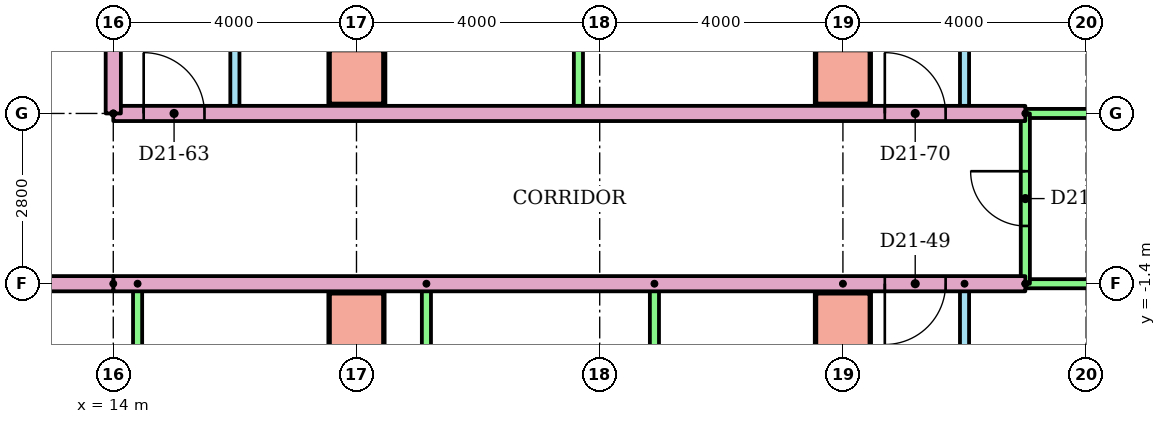
"""IFC4 building model, lengths in metres.
Left out: names, types, materials, properties, quantities, classifications, styles, units other than length and angle.
Written with IfcOpenShell. Run it as: python <this file> out.ifc"""

import sys

from ifc_helpers import new_model, si_unit, direction, frame, frame_2d, origin, origin_2d, place, context, subcontext, project, spatial, rectangle, extrude, element, fill, save


model = new_model("IFC4")
c1 = context("Model", 3, precision=1e-05, world=origin(), true_north=direction((0.0, 1.0)))
c2 = subcontext(c1, "Body", "Model", "MODEL_VIEW")
j1 = project(units=[si_unit("LENGTHUNIT", "METRE"), si_unit("PLANEANGLEUNIT", "RADIAN")], contexts=[c1])
p1 = place(None, origin())
s1 = spatial("IfcSite", under=j1, at=p1, CompositionType="ELEMENT")
p2 = place(p1, origin())
s2 = spatial("IfcBuilding", under=s1, at=p2, CompositionType="ELEMENT")
p3 = place(p2, frame((0.0, 0.0, 83.9)))
s3 = spatial("IfcBuildingStorey", under=s2, at=p3, CompositionType="ELEMENT", Elevation=83.9)
for number, where in (
    (1, (18.0, -2.0, 0.0)),
    (2, (26.0, -2.0, 0.0)),
    (3, (18.0, 2.0, 0.0)),
    (4, (26.0, 2.0, 0.0)),
):
    element("IfcColumn", number, at=place(p3, frame(where)), inside=s3, PredefinedType="COLUMN", context=c2, shape_type="SweptSolid", body=[
        extrude(rectangle(XDim=0.9, YDim=0.9, at=origin_2d()), origin(), (0.0, 0.0, 1.0), 3.2),
    ])
for number, where, z_axis, x_axis in (
    (5, (14.4, -1.4, 0.0), (0.0, 0.0, 1.0), (0.0, -1.0, 0.0)),
    (6, (19.15, -1.4, 0.0), (0.0, 0.0, 1.0), (0.0, -1.0, 0.0)),
    (7, (22.9, -1.4, 0.0), (0.0, 0.0, 1.0), (0.0, -1.0, 0.0)),
):
    element("IfcWall", number, at=place(p3, frame(where, z_axis=z_axis, x_axis=x_axis)), inside=s3, PredefinedType="PARTITIONING", context=c2, shape_type="SweptSolid", body=[
        extrude(rectangle(XDim=6.5, YDim=0.15, at=frame_2d((3.25, 0.0))), origin(), (0.0, 0.0, 1.0), 2.4),
    ])
p4 = place(p3, frame((28.0, -1.4, 0.0), z_axis=(0.0, 0.0, 1.0), x_axis=(0.0, -1.0, 0.0)))
e8 = element("IfcWall", 8, at=p4, inside=s3, PredefinedType="PARTITIONING", context=c2, shape_type="SweptSolid", body=[
    extrude(rectangle(XDim=6.5, YDim=0.15, at=frame_2d((3.25, 0.0))), origin(), (0.0, 0.0, 1.0), 2.4),
])
p5 = place(p4, frame((1.3, 0.0, 0.0)))
e9 = element("IfcOpeningElement", 9, at=p5, cuts=e8, PredefinedType="OPENING", context=c2, shape_type="SweptSolid", body=[
    extrude(rectangle(XDim=0.9, YDim=2.1, at=frame_2d((0.45, 1.05))), frame((0.0, 0.085, 0.0), z_axis=(0.0, -1.0, 0.0), x_axis=(1.0, 0.0, 0.0)), (0.0, 0.0, 1.0), 0.17),
])
p6 = place(p4, frame((4.6, 0.0, 0.0)))
e10 = element("IfcOpeningElement", 10, at=p6, cuts=e8, PredefinedType="OPENING", context=c2, shape_type="SweptSolid", body=[
    extrude(rectangle(XDim=0.8, YDim=2.1, at=frame_2d((0.4, 1.05))), frame((0.0, 0.085, 0.0), z_axis=(0.0, -1.0, 0.0), x_axis=(1.0, 0.0, 0.0)), (0.0, 0.0, 1.0), 0.17),
])
p7 = place(p3, frame((26.0, -1.4, 0.0), z_axis=(0.0, 0.0, 1.0), x_axis=(0.0, -1.0, 0.0)))
e11 = element("IfcWall", 11, at=p7, inside=s3, PredefinedType="PARTITIONING", context=c2, shape_type="SweptSolid", body=[
    extrude(rectangle(XDim=14.81, YDim=0.25, at=frame_2d((7.405, 0.0))), origin(), (0.0, 0.0, 1.0), 2.4),
])
p8 = place(p3, frame((29.0, -1.4, 0.0), z_axis=(0.0, 0.0, 1.0), x_axis=(-1.0, 0.0, 0.0)))
e12 = element("IfcWall", 12, at=p8, inside=s3, PredefinedType="PARTITIONING", context=c2, shape_type="SweptSolid", body=[
    extrude(rectangle(XDim=15.0, YDim=0.25, at=frame_2d((7.5, 0.0))), origin(), (0.0, 0.0, 1.0), 2.4),
])
p9 = place(p8, frame((1.311, 0.0, 0.0)))
e13 = element("IfcOpeningElement", 13, at=p9, cuts=e12, PredefinedType="OPENING", context=c2, shape_type="SweptSolid", body=[
    extrude(rectangle(XDim=1.0, YDim=2.1, at=frame_2d((0.5, 1.05))), frame((0.0, 0.135, 0.0), z_axis=(0.0, -1.0, 0.0), x_axis=(1.0, 0.0, 0.0)), (0.0, 0.0, 1.0), 0.27),
])
p10 = place(p3, frame((40.62, -1.4, 0.0), z_axis=(0.0, 0.0, 1.0), x_axis=(-1.0, 0.0, 0.0)))
e14 = element("IfcWall", 14, at=p10, inside=s3, PredefinedType="PARTITIONING", context=c2, shape_type="SweptSolid", body=[
    extrude(rectangle(XDim=11.62, YDim=0.15, at=frame_2d((5.81, 0.0))), origin(), (0.0, 0.0, 1.0), 2.4),
])
p11 = place(p3, frame((16.0, 10.3, 0.0), z_axis=(0.0, 0.0, 1.0), x_axis=(0.0, -1.0, 0.0)))
e15 = element("IfcWall", 15, at=p11, inside=s3, PredefinedType="PARTITIONING", context=c2, shape_type="SweptSolid", body=[
    extrude(rectangle(XDim=8.9, YDim=0.15, at=frame_2d((4.45, 0.0))), origin(), (0.0, 0.0, 1.0), 2.4),
])
p12 = place(p11, frame((5.95, 0.0, 0.0)))
e16 = element("IfcOpeningElement", 16, at=p12, cuts=e15, PredefinedType="OPENING", context=c2, shape_type="SweptSolid", body=[
    extrude(rectangle(XDim=0.9, YDim=2.1, at=frame_2d((0.45, 1.05))), frame((0.0, 0.085, 0.0), z_axis=(0.0, -1.0, 0.0), x_axis=(1.0, 0.0, 0.0)), (0.0, 0.0, 1.0), 0.17),
])
p13 = place(p11, frame((1.55, 0.0, 0.0)))
e17 = element("IfcOpeningElement", 17, at=p13, cuts=e15, PredefinedType="OPENING", context=c2, shape_type="SweptSolid", body=[
    extrude(rectangle(XDim=0.8, YDim=2.1, at=frame_2d((0.4, 1.05))), frame((0.0, 0.085, 0.0), z_axis=(0.0, -1.0, 0.0), x_axis=(1.0, 0.0, 0.0)), (0.0, 0.0, 1.0), 0.17),
])
for number, where, z_axis, x_axis in (
    (18, (18.4, 10.3, 0.0), (0.0, 0.0, 1.0), (0.0, -1.0, 0.0)),
    (19, (21.65, 10.3, 0.0), (0.0, 0.0, 1.0), (0.0, -1.0, 0.0)),
):
    element("IfcWall", number, at=place(p3, frame(where, z_axis=z_axis, x_axis=x_axis)), inside=s3, PredefinedType="PARTITIONING", context=c2, shape_type="SweptSolid", body=[
        extrude(rectangle(XDim=8.9, YDim=0.15, at=frame_2d((4.45, 0.0))), origin(), (0.0, 0.0, 1.0), 2.4),
    ])
p14 = place(p3, frame((28.0, 10.3, 0.0), z_axis=(0.0, 0.0, 1.0), x_axis=(0.0, -1.0, 0.0)))
e20 = element("IfcWall", 20, at=p14, inside=s3, PredefinedType="PARTITIONING", context=c2, shape_type="SweptSolid", body=[
    extrude(rectangle(XDim=8.9, YDim=0.15, at=frame_2d((4.45, 0.0))), origin(), (0.0, 0.0, 1.0), 2.4),
])
p15 = place(p14, frame((5.95, 0.0, 0.0)))
e21 = element("IfcOpeningElement", 21, at=p15, cuts=e20, PredefinedType="OPENING", context=c2, shape_type="SweptSolid", body=[
    extrude(rectangle(XDim=0.9, YDim=2.1, at=frame_2d((0.45, 1.05))), frame((0.0, 0.085, 0.0), z_axis=(0.0, -1.0, 0.0), x_axis=(1.0, 0.0, 0.0)), (0.0, 0.0, 1.0), 0.17),
])
p16 = place(p14, frame((1.55, 0.0, 0.0)))
e22 = element("IfcOpeningElement", 22, at=p16, cuts=e20, PredefinedType="OPENING", context=c2, shape_type="SweptSolid", body=[
    extrude(rectangle(XDim=0.8, YDim=2.1, at=frame_2d((0.4, 1.05))), frame((0.0, 0.085, 0.0), z_axis=(0.0, -1.0, 0.0), x_axis=(1.0, 0.0, 0.0)), (0.0, 0.0, 1.0), 0.17),
])
p17 = place(p3, frame((26.0, 18.621, 0.0), z_axis=(0.0, 0.0, 1.0), x_axis=(0.0, -1.0, 0.0)))
e23 = element("IfcWall", 23, at=p17, inside=s3, PredefinedType="PARTITIONING", context=c2, shape_type="SweptSolid", body=[
    extrude(rectangle(XDim=17.221, YDim=0.25, at=frame_2d((8.611, 0.0))), origin(), (0.0, 0.0, 1.0), 2.4),
])
p18 = place(p3, frame((14.0, 1.4, 0.0)))
e24 = element("IfcWall", 24, at=p18, inside=s3, PredefinedType="PARTITIONING", context=c2, shape_type="SweptSolid", body=[
    extrude(rectangle(XDim=15.0, YDim=0.25, at=frame_2d((7.5, 0.0))), origin(), (0.0, 0.0, 1.0), 2.4),
])
p19 = place(p18, frame((0.5, 0.0, 0.0)))
e25 = element("IfcOpeningElement", 25, at=p19, cuts=e24, PredefinedType="OPENING", context=c2, shape_type="SweptSolid", body=[
    extrude(rectangle(XDim=1.0, YDim=2.1, at=frame_2d((0.5, 1.05))), frame((0.0, 0.135, 0.0), z_axis=(0.0, -1.0, 0.0), x_axis=(1.0, 0.0, 0.0)), (0.0, 0.0, 1.0), 0.27),
])
p20 = place(p18, frame((12.689, 0.0, 0.0)))
e26 = element("IfcOpeningElement", 26, at=p20, cuts=e24, PredefinedType="OPENING", context=c2, shape_type="SweptSolid", body=[
    extrude(rectangle(XDim=1.0, YDim=2.1, at=frame_2d((0.5, 1.05))), frame((0.0, 0.135, 0.0), z_axis=(0.0, -1.0, 0.0), x_axis=(1.0, 0.0, 0.0)), (0.0, 0.0, 1.0), 0.27),
])
p21 = place(p3, frame((29.0, 1.4, 0.0)))
e27 = element("IfcWall", 27, at=p21, inside=s3, PredefinedType="PARTITIONING", context=c2, shape_type="SweptSolid", body=[
    extrude(rectangle(XDim=11.62, YDim=0.15, at=frame_2d((5.81, 0.0))), origin(), (0.0, 0.0, 1.0), 2.4),
])
p22 = place(p3, frame((29.0, -1.4, 0.0), z_axis=(0.0, 0.0, 1.0), x_axis=(0.0, 1.0, 0.0)))
e28 = element("IfcWall", 28, at=p22, inside=s3, PredefinedType="PARTITIONING", context=c2, shape_type="SweptSolid", body=[
    extrude(rectangle(XDim=2.8, YDim=0.15, at=frame_2d((1.4, 0.0))), origin(), (0.0, 0.0, 1.0), 2.4),
])
p23 = place(p22, frame((0.95, 0.0, 0.0)))
e29 = element("IfcOpeningElement", 29, at=p23, cuts=e28, PredefinedType="OPENING", context=c2, shape_type="SweptSolid", body=[
    extrude(rectangle(XDim=0.9, YDim=2.1, at=frame_2d((0.45, 1.05))), frame((0.0, 0.085, 0.0), z_axis=(0.0, -1.0, 0.0), x_axis=(1.0, 0.0, 0.0)), (0.0, 0.0, 1.0), 0.17),
])
p24 = place(p3, frame((14.0, -1.4, 0.0), z_axis=(0.0, 0.0, 1.0), x_axis=(-1.0, 0.0, 0.0)))
e30 = element("IfcWall", 30, at=p24, inside=s3, PredefinedType="PARTITIONING", context=c2, shape_type="SweptSolid", body=[
    extrude(rectangle(XDim=28.0, YDim=0.25, at=frame_2d((14.0, 0.0))), origin(), (0.0, 0.0, 1.0), 2.4),
])
p25 = place(p24, frame((20.689, 0.0, 0.0)))
e31 = element("IfcOpeningElement", 31, at=p25, cuts=e30, PredefinedType="OPENING", context=c2, shape_type="SweptSolid", body=[
    extrude(rectangle(XDim=1.0, YDim=2.1, at=frame_2d((0.5, 1.05))), frame((0.0, 0.135, 0.0), z_axis=(0.0, -1.0, 0.0), x_axis=(1.0, 0.0, 0.0)), (0.0, 0.0, 1.0), 0.27),
])
p26 = place(p24, frame((18.311, 0.0, 0.0)))
e32 = element("IfcOpeningElement", 32, at=p26, cuts=e30, PredefinedType="OPENING", context=c2, shape_type="SweptSolid", body=[
    extrude(rectangle(XDim=1.0, YDim=2.1, at=frame_2d((0.5, 1.05))), frame((0.0, 0.135, 0.0), z_axis=(0.0, -1.0, 0.0), x_axis=(1.0, 0.0, 0.0)), (0.0, 0.0, 1.0), 0.27),
])
p27 = place(p24, frame((2.311, 0.0, 0.0)))
e33 = element("IfcOpeningElement", 33, at=p27, cuts=e30, PredefinedType="OPENING", context=c2, shape_type="SweptSolid", body=[
    extrude(rectangle(XDim=1.0, YDim=2.1, at=frame_2d((0.5, 1.05))), frame((0.0, 0.135, 0.0), z_axis=(0.0, -1.0, 0.0), x_axis=(1.0, 0.0, 0.0)), (0.0, 0.0, 1.0), 0.27),
])
p28 = place(p3, frame((14.0, 1.4, 0.0), z_axis=(0.0, 0.0, 1.0), x_axis=(0.0, 1.0, 0.0)))
e34 = element("IfcWall", 34, at=p28, inside=s3, PredefinedType="PARTITIONING", context=c2, shape_type="SweptSolid", body=[
    extrude(rectangle(XDim=1.6, YDim=0.25, at=frame_2d((0.8, 0.0))), origin(), (0.0, 0.0, 1.0), 2.4),
])
p29 = place(p9, origin())
e35 = element("IfcDoor", 35, at=p29, inside=s3, OperationType="SINGLE_SWING_RIGHT", PredefinedType="DOOR", context=c2, shape_type="SweptSolid", body=[
    extrude(rectangle(XDim=1.0, YDim=2.1, at=frame_2d((0.5, 1.05))), frame((0.0, 0.025, 0.0), z_axis=(0.0, -1.0, 0.0), x_axis=(1.0, 0.0, 0.0)), (0.0, 0.0, 1.0), 0.05),
])
fill(e13, e35)
p30 = place(p19, origin())
e36 = element("IfcDoor", 36, at=p30, inside=s3, OperationType="SINGLE_SWING_LEFT", PredefinedType="DOOR", context=c2, shape_type="SweptSolid", body=[
    extrude(rectangle(XDim=1.0, YDim=2.1, at=frame_2d((0.5, 1.05))), frame((0.0, 0.025, 0.0), z_axis=(0.0, -1.0, 0.0), x_axis=(1.0, 0.0, 0.0)), (0.0, 0.0, 1.0), 0.05),
])
fill(e25, e36)
p31 = place(p20, origin())
e37 = element("IfcDoor", 37, at=p31, inside=s3, OperationType="SINGLE_SWING_LEFT", PredefinedType="DOOR", context=c2, shape_type="SweptSolid", body=[
    extrude(rectangle(XDim=1.0, YDim=2.1, at=frame_2d((0.5, 1.05))), frame((0.0, 0.025, 0.0), z_axis=(0.0, -1.0, 0.0), x_axis=(1.0, 0.0, 0.0)), (0.0, 0.0, 1.0), 0.05),
])
fill(e26, e37)
p32 = place(p23, origin())
e38 = element("IfcDoor", 38, at=p32, inside=s3, OperationType="SINGLE_SWING_RIGHT", PredefinedType="DOOR", context=c2, shape_type="SweptSolid", body=[
    extrude(rectangle(XDim=0.9, YDim=2.1, at=frame_2d((0.45, 1.05))), frame((0.0, 0.025, 0.0), z_axis=(0.0, -1.0, 0.0), x_axis=(1.0, 0.0, 0.0)), (0.0, 0.0, 1.0), 0.05),
])
fill(e29, e38)
save(model, sys.argv[1])
